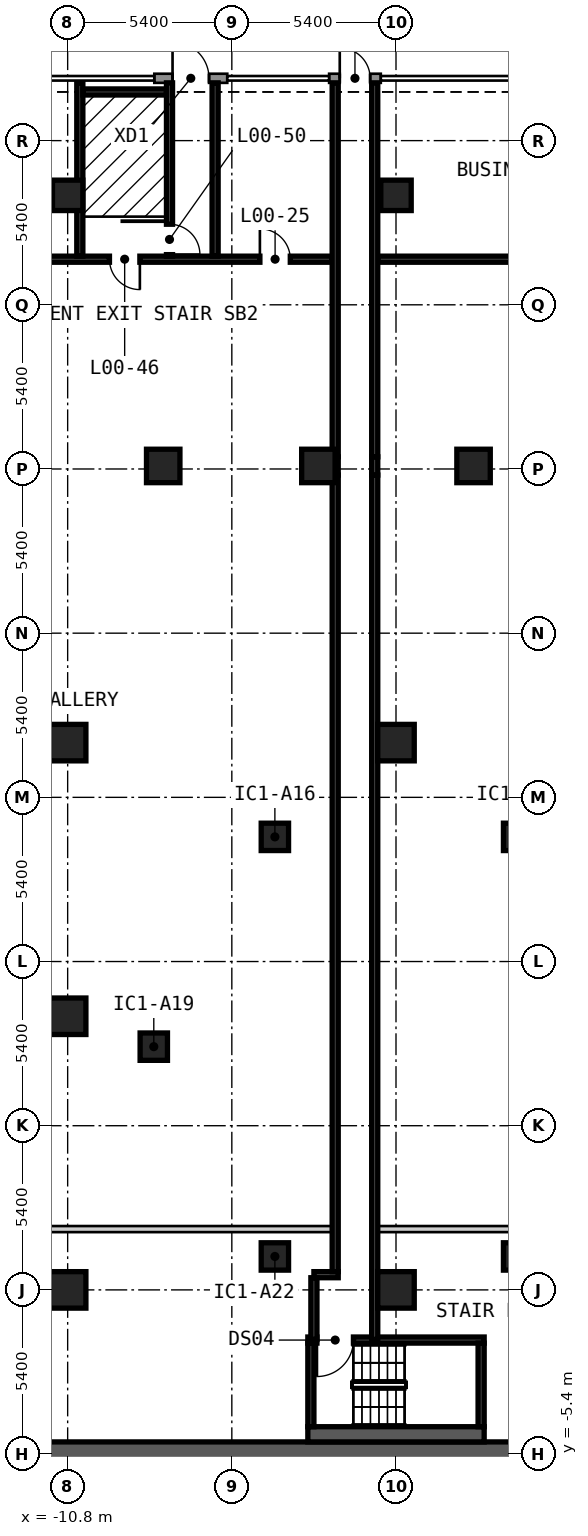
"""IFC4 building model, lengths in metres.
Left out: names, types, materials, properties, quantities, classifications, styles, units other than length and angle.
Written with IfcOpenShell. Run it as: python <this file> out.ifc"""

import sys

from ifc_helpers import new_model, si_unit, direction, frame, frame_2d, origin, origin_2d, place, context, subcontext, project, spatial, rectangle, extrude, element, fill, save


model = new_model("IFC4")
c1 = context("Model", 3, precision=1e-05, world=origin(), true_north=direction((0.0, 1.0)))
c2 = subcontext(c1, "Body", "Model", "MODEL_VIEW")
j1 = project(units=[si_unit("LENGTHUNIT", "METRE"), si_unit("PLANEANGLEUNIT", "RADIAN")], contexts=[c1])
p1 = place(None, origin())
s1 = spatial("IfcSite", under=j1, at=p1, CompositionType="ELEMENT")
p2 = place(p1, origin())
s2 = spatial("IfcBuilding", under=s1, at=p2, CompositionType="ELEMENT")
p3 = place(p2, origin())
s3 = spatial("IfcBuildingStorey", under=s2, at=p3, CompositionType="ELEMENT", Elevation=0.0)
for number, where, z_axis, x_axis in (
    (1, (2.551, 27.1, 0.0), (0.0, 0.0, 1.0), (-1.0, 0.0, 0.0)),
    (2, (-2.553, 27.1, 0.0), (0.0, 0.0, 1.0), (-1.0, 0.0, 0.0)),
    (3, (-7.657, 27.1, 0.0), (0.0, 0.0, 1.0), (-1.0, 0.0, 0.0)),
):
    element("IfcColumn", number, at=place(p3, frame(where, z_axis=z_axis, x_axis=x_axis)), inside=s3, PredefinedType="COLUMN", context=c2, shape_type="SweptSolid", body=[
        extrude(rectangle(XDim=1.1, YDim=1.1, at=origin_2d()), origin(), (0.0, 0.0, 1.0), 5.0),
    ])
for number, where, z_axis, x_axis in (
    (4, (3.984, 1.1, 0.0), (0.0, 0.0, 1.0), (1.0, 0.0, 0.0)),
    (5, (3.984, 14.9, 0.0), (0.0, 0.0, 1.0), (1.0, 0.0, 0.0)),
    (6, (-3.984, 14.9, 0.0), (0.0, 0.0, 1.0), (1.0, 0.0, 0.0)),
    (7, (-7.967, 8.0, 0.0), (0.0, 0.0, 1.0), (1.0, 0.0, 0.0)),
    (8, (-3.984, 1.1, 0.0), (0.0, 0.0, 1.0), (1.0, 0.0, 0.0)),
):
    element("IfcColumn", number, at=place(p3, frame(where, z_axis=z_axis, x_axis=x_axis)), inside=s3, PredefinedType="COLUMN", context=c2, shape_type="SweptSolid", body=[
        extrude(rectangle(XDim=0.9, YDim=0.9, at=origin_2d()), origin(), (0.0, 0.0, 1.0), 5.0),
    ])
for number, where, z_axis, x_axis in (
    (9, (-10.8, 0.0, 0.0), (0.0, 0.0, 1.0), (1.0, 0.0, 0.0)),
    (10, (-10.8, 9.0, 0.0), (0.0, 0.0, 1.0), (1.0, 0.0, 0.0)),
    (11, (-10.8, 18.0, 0.0), (0.0, 0.0, 1.0), (1.0, 0.0, 0.0)),
    (12, (0.0, 0.0, 0.0), (0.0, 0.0, 1.0), (1.0, 0.0, 0.0)),
    (13, (0.0, 18.0, 0.0), (0.0, 0.0, 1.0), (1.0, 0.0, 0.0)),
):
    element("IfcColumn", number, at=place(p3, frame(where, z_axis=z_axis, x_axis=x_axis)), inside=s3, PredefinedType="COLUMN", context=c2, shape_type="SweptSolid", body=[
        extrude(rectangle(XDim=1.2, YDim=1.2, at=origin_2d()), origin(), (0.0, 0.0, 1.0), 5.0),
    ])
for number, where, z_axis, x_axis in (
    (14, (-10.8, 36.0, 0.0), (0.0, 0.0, 1.0), (1.0, 0.0, 0.0)),
    (15, (0.0, 36.0, 0.0), (0.0, 0.0, 1.0), (1.0, 0.0, 0.0)),
):
    element("IfcColumn", number, at=place(p3, frame(where, z_axis=z_axis, x_axis=x_axis)), inside=s3, PredefinedType="COLUMN", context=c2, shape_type="SweptSolid", body=[
        extrude(rectangle(XDim=1.0, YDim=1.0, at=origin_2d()), origin(), (0.0, 0.0, 1.0), 5.0),
    ])
p4 = place(p3, frame((-13.3, -5.6, 0.0), z_axis=(0.0, 0.0, 1.0), x_axis=(1.0, 0.0, 0.0)))
e16 = element("IfcWall", 16, at=p4, inside=s3, PredefinedType="SHEAR", context=c2, shape_type="SweptSolid", body=[
    extrude(rectangle(XDim=26.6, YDim=1.2, at=frame_2d((13.3, 0.0))), origin(), (0.0, 0.0, 1.0), 4.55),
])
p5 = place(p4, frame((23.65, 0.0, 0.0)))
e17 = element("IfcOpeningElement", 17, at=p5, cuts=e16, PredefinedType="OPENING", context=c2, shape_type="SweptSolid", body=[
    extrude(rectangle(XDim=1.2, YDim=2.1, at=frame_2d((0.6, 1.05))), frame((0.0, 0.61, 0.0), z_axis=(0.0, -1.0, 0.0), x_axis=(1.0, 0.0, 0.0)), (0.0, 0.0, 1.0), 1.22),
])
p6 = place(p3, frame((-0.5, 39.85, 0.0), z_axis=(0.0, 0.0, 1.0), x_axis=(-1.0, 0.0, 0.0)))
e18 = element("IfcWall", 18, at=p6, inside=s3, PredefinedType="SOLIDWALL", context=c2, shape_type="SweptSolid", body=[
    extrude(rectangle(XDim=1.7, YDim=0.3, at=frame_2d((0.85, 0.0))), origin(), (0.0, 0.0, 1.0), 4.55),
])
p7 = place(p6, frame((1.35, 0.0, 0.0), z_axis=(0.0, 0.0, 1.0), x_axis=(-1.0, 0.0, 0.0)))
e19 = element("IfcOpeningElement", 19, at=p7, cuts=e18, PredefinedType="OPENING", context=c2, shape_type="SweptSolid", body=[
    extrude(rectangle(XDim=1.0, YDim=2.4, at=frame_2d((0.5, 1.2))), frame((0.0, 0.16, 0.0), z_axis=(0.0, -1.0, 0.0), x_axis=(1.0, 0.0, 0.0)), (0.0, 0.0, 1.0), 0.32),
])
p8 = place(p3, frame((-5.55, 39.85, 0.0), z_axis=(0.0, 0.0, 1.0), x_axis=(-1.0, 0.0, 0.0)))
e20 = element("IfcWall", 20, at=p8, inside=s3, PredefinedType="SOLIDWALL", context=c2, shape_type="SweptSolid", body=[
    extrude(rectangle(XDim=2.4, YDim=0.3, at=frame_2d((1.2, 0.0))), origin(), (0.0, 0.0, 1.0), 4.55),
])
p9 = place(p8, frame((1.8, 0.0, 0.0), z_axis=(0.0, 0.0, 1.0), x_axis=(-1.0, 0.0, 0.0)))
e21 = element("IfcOpeningElement", 21, at=p9, cuts=e20, PredefinedType="OPENING", context=c2, shape_type="SweptSolid", body=[
    extrude(rectangle(XDim=1.2, YDim=2.4, at=frame_2d((0.6, 1.2))), frame((0.0, 0.16, 0.0), z_axis=(0.0, -1.0, 0.0), x_axis=(1.0, 0.0, 0.0)), (0.0, 0.0, 1.0), 0.32),
])
p10 = place(p3, frame((-2.9, -4.75, 0.0), z_axis=(0.0, 0.0, 1.0), x_axis=(1.0, 0.0, 0.0)))
e22 = element("IfcWall", 22, at=p10, inside=s3, PredefinedType="SOLIDWALL", context=c2, shape_type="SweptSolid", body=[
    extrude(rectangle(XDim=5.8, YDim=0.5, at=frame_2d((2.9, 0.0))), origin(), (0.0, 0.0, 1.0), 4.55),
])
p11 = place(p3, frame((-2.9, -1.65, 0.0), z_axis=(0.0, 0.0, 1.0), x_axis=(1.0, 0.0, 0.0)))
e23 = element("IfcWall", 23, at=p11, inside=s3, PredefinedType="SOLIDWALL", context=c2, shape_type="SweptSolid", body=[
    extrude(rectangle(XDim=5.8, YDim=0.2, at=frame_2d((2.9, 0.0))), origin(), (0.0, 0.0, 1.0), 4.55),
])
p12 = place(p11, frame((0.3, 0.0, 0.0)))
e24 = element("IfcOpeningElement", 24, at=p12, cuts=e23, PredefinedType="OPENING", context=c2, shape_type="SweptSolid", body=[
    extrude(rectangle(XDim=1.2, YDim=2.1, at=frame_2d((0.6, 1.05))), frame((0.0, 0.11, 0.0), z_axis=(0.0, -1.0, 0.0), x_axis=(1.0, 0.0, 0.0)), (0.0, 0.0, 1.0), 0.22),
])
for number, where, z_axis, x_axis in (
    (25, (-2.8, -4.5, 0.0), (0.0, 0.0, 1.0), (0.0, 1.0, 0.0)),
    (26, (2.8, -4.5, 0.0), (0.0, 0.0, 1.0), (0.0, 1.0, 0.0)),
):
    element("IfcWall", number, at=place(p3, frame(where, z_axis=z_axis, x_axis=x_axis)), inside=s3, PredefinedType="SOLIDWALL", context=c2, shape_type="SweptSolid", body=[
        extrude(rectangle(XDim=2.75, YDim=0.2, at=frame_2d((1.375, 0.0))), origin(), (0.0, 0.0, 1.0), 4.55),
    ])
p13 = place(p3, frame((-2.7, 0.5, 0.0), z_axis=(0.0, 0.0, 1.0), x_axis=(1.0, 0.0, 0.0)))
e27 = element("IfcWall", 27, at=p13, inside=s3, PredefinedType="SOLIDWALL", context=c2, shape_type="SweptSolid", body=[
    extrude(rectangle(XDim=0.8, YDim=0.2, at=frame_2d((0.4, 0.0))), origin(), (0.0, 0.0, 1.0), 4.55),
])
p14 = place(p3, frame((-24.0, 2.0, 0.0), z_axis=(0.0, 0.0, 1.0), x_axis=(1.0, 0.0, 0.0)))
e28 = element("IfcWall", 28, at=p14, inside=s3, PredefinedType="PARTITIONING", context=c2, shape_type="SweptSolid", body=[
    extrude(rectangle(XDim=22.0, YDim=0.2, at=frame_2d((11.0, 0.0))), origin(), (0.0, 0.0, 1.0), 4.55),
])
p15 = place(p14, frame((10.099, 0.0, 0.0)))
e29 = element("IfcOpeningElement", 29, at=p15, cuts=e28, PredefinedType="OPENING", context=c2, shape_type="SweptSolid", body=[
    extrude(rectangle(XDim=1.8, YDim=2.1, at=frame_2d((0.9, 1.05))), frame((0.0, 0.11, 0.0), z_axis=(0.0, -1.0, 0.0), x_axis=(1.0, 0.0, 0.0)), (0.0, 0.0, 1.0), 0.22),
])
p16 = place(p3, frame((-0.6, 2.0, 0.0), z_axis=(0.0, 0.0, 1.0), x_axis=(1.0, 0.0, 0.0)))
e30 = element("IfcWall", 30, at=p16, inside=s3, PredefinedType="PARTITIONING", context=c2, shape_type="SweptSolid", body=[
    extrude(rectangle(XDim=22.1, YDim=0.2, at=frame_2d((11.05, 0.0))), origin(), (0.0, 0.0, 1.0), 4.55),
])
p17 = place(p16, frame((13.6, 0.0, 0.0)))
e31 = element("IfcOpeningElement", 31, at=p17, cuts=e30, PredefinedType="OPENING", context=c2, shape_type="SweptSolid", body=[
    extrude(rectangle(XDim=1.0, YDim=2.1, at=frame_2d((0.5, 1.05))), frame((0.0, 0.11, 0.0), z_axis=(0.0, -1.0, 0.0), x_axis=(1.0, 0.0, 0.0)), (0.0, 0.0, 1.0), 0.22),
])
p18 = place(p16, frame((16.8, 0.0, 0.0)))
e32 = element("IfcOpeningElement", 32, at=p18, cuts=e30, PredefinedType="OPENING", context=c2, shape_type="SweptSolid", body=[
    extrude(rectangle(XDim=0.9, YDim=2.1, at=frame_2d((0.45, 1.05))), frame((0.0, 0.11, 0.0), z_axis=(0.0, -1.0, 0.0), x_axis=(1.0, 0.0, 0.0)), (0.0, 0.0, 1.0), 0.22),
])
p19 = place(p16, frame((20.1, 0.0, 0.0)))
e33 = element("IfcOpeningElement", 33, at=p19, cuts=e30, PredefinedType="OPENING", context=c2, shape_type="SweptSolid", body=[
    extrude(rectangle(XDim=0.9, YDim=2.1, at=frame_2d((0.45, 1.05))), frame((0.0, 0.11, 0.0), z_axis=(0.0, -1.0, 0.0), x_axis=(1.0, 0.0, 0.0)), (0.0, 0.0, 1.0), 0.22),
])
p20 = place(p16, frame((5.35, 0.0, 0.0)))
e34 = element("IfcOpeningElement", 34, at=p20, cuts=e30, PredefinedType="OPENING", context=c2, shape_type="SweptSolid", body=[
    extrude(rectangle(XDim=1.8, YDim=2.1, at=frame_2d((0.9, 1.05))), frame((0.0, 0.11, 0.0), z_axis=(0.0, -1.0, 0.0), x_axis=(1.0, 0.0, 0.0)), (0.0, 0.0, 1.0), 0.22),
])
p21 = place(p3, frame((-21.0, 33.9, 0.0), z_axis=(0.0, 0.0, 1.0), x_axis=(1.0, 0.0, 0.0)))
e35 = element("IfcWall", 35, at=p21, inside=s3, PredefinedType="SOLIDWALL", context=c2, shape_type="SweptSolid", body=[
    extrude(rectangle(XDim=18.9, YDim=0.2, at=frame_2d((9.45, 0.0))), origin(), (0.0, 0.0, 1.0), 4.55),
])
p22 = place(p21, frame((7.025, 0.0, 0.0)))
e36 = element("IfcOpeningElement", 36, at=p22, cuts=e35, PredefinedType="OPENING", context=c2, shape_type="SweptSolid", body=[
    extrude(rectangle(XDim=1.0, YDim=2.1, at=frame_2d((0.5, 1.05))), frame((0.0, 0.11, 0.0), z_axis=(0.0, -1.0, 0.0), x_axis=(1.0, 0.0, 0.0)), (0.0, 0.0, 1.0), 0.22),
])
p23 = place(p21, frame((16.523, 0.0, 0.0)))
e37 = element("IfcOpeningElement", 37, at=p23, cuts=e35, PredefinedType="OPENING", context=c2, shape_type="SweptSolid", body=[
    extrude(rectangle(XDim=1.0, YDim=2.1, at=frame_2d((0.5, 1.05))), frame((0.0, 0.11, 0.0), z_axis=(0.0, -1.0, 0.0), x_axis=(1.0, 0.0, 0.0)), (0.0, 0.0, 1.0), 0.22),
])
p24 = place(p21, frame((0.893, 0.0, 0.0)))
e38 = element("IfcOpeningElement", 38, at=p24, cuts=e35, PredefinedType="OPENING", context=c2, shape_type="SweptSolid", body=[
    extrude(rectangle(XDim=1.0, YDim=2.1, at=frame_2d((0.5, 1.05))), frame((0.0, 0.11, 0.0), z_axis=(0.0, -1.0, 0.0), x_axis=(1.0, 0.0, 0.0)), (0.0, 0.0, 1.0), 0.22),
])
p25 = place(p21, frame((11.575, 0.0, 0.0)))
e39 = element("IfcOpeningElement", 39, at=p25, cuts=e35, PredefinedType="OPENING", context=c2, shape_type="SweptSolid", body=[
    extrude(rectangle(XDim=1.0, YDim=2.1, at=frame_2d((0.5, 1.05))), frame((0.0, 0.11, 0.0), z_axis=(0.0, -1.0, 0.0), x_axis=(1.0, 0.0, 0.0)), (0.0, 0.0, 1.0), 0.22),
])
p26 = place(p3, frame((-0.6, 33.9, 0.0), z_axis=(0.0, 0.0, 1.0), x_axis=(1.0, 0.0, 0.0)))
e40 = element("IfcWall", 40, at=p26, inside=s3, PredefinedType="SOLIDWALL", context=c2, shape_type="SweptSolid", body=[
    extrude(rectangle(XDim=21.6, YDim=0.2, at=frame_2d((10.8, 0.0))), origin(), (0.0, 0.0, 1.0), 4.55),
])
p27 = place(p26, frame((5.152, 0.0, 0.0)))
e41 = element("IfcOpeningElement", 41, at=p27, cuts=e40, PredefinedType="OPENING", context=c2, shape_type="SweptSolid", body=[
    extrude(rectangle(XDim=1.0, YDim=2.1, at=frame_2d((0.5, 1.05))), frame((0.0, 0.11, 0.0), z_axis=(0.0, -1.0, 0.0), x_axis=(1.0, 0.0, 0.0)), (0.0, 0.0, 1.0), 0.22),
])
p28 = place(p26, frame((13.825, 0.0, 0.0)))
e42 = element("IfcOpeningElement", 42, at=p28, cuts=e40, PredefinedType="OPENING", context=c2, shape_type="SweptSolid", body=[
    extrude(rectangle(XDim=1.0, YDim=2.1, at=frame_2d((0.5, 1.05))), frame((0.0, 0.11, 0.0), z_axis=(0.0, -1.0, 0.0), x_axis=(1.0, 0.0, 0.0)), (0.0, 0.0, 1.0), 0.22),
])
p29 = place(p26, frame((19.707, 0.0, 0.0)))
e43 = element("IfcOpeningElement", 43, at=p29, cuts=e40, PredefinedType="OPENING", context=c2, shape_type="SweptSolid", body=[
    extrude(rectangle(XDim=1.0, YDim=2.1, at=frame_2d((0.5, 1.05))), frame((0.0, 0.11, 0.0), z_axis=(0.0, -1.0, 0.0), x_axis=(1.0, 0.0, 0.0)), (0.0, 0.0, 1.0), 0.22),
])
p30 = place(p3, frame((-10.4, 34.0, 0.0), z_axis=(0.0, 0.0, 1.0), x_axis=(0.0, 1.0, 0.0)))
e44 = element("IfcWall", 44, at=p30, inside=s3, PredefinedType="SOLIDWALL", context=c2, shape_type="SweptSolid", body=[
    extrude(rectangle(XDim=5.7, YDim=0.2, at=frame_2d((2.85, 0.0))), origin(), (0.0, 0.0, 1.0), 4.55),
])
p31 = place(p3, frame((-7.45, 34.0, 0.0), z_axis=(0.0, 0.0, 1.0), x_axis=(0.0, 1.0, 0.0)))
e45 = element("IfcWall", 45, at=p31, inside=s3, PredefinedType="SOLIDWALL", context=c2, shape_type="SweptSolid", body=[
    extrude(rectangle(XDim=5.7, YDim=0.2, at=frame_2d((2.85, 0.0))), origin(), (0.0, 0.0, 1.0), 4.55),
])
p32 = place(p31, frame((1.05, 0.0, 0.0), z_axis=(0.0, 0.0, 1.0), x_axis=(-1.0, 0.0, 0.0)))
e46 = element("IfcOpeningElement", 46, at=p32, cuts=e45, PredefinedType="OPENING", context=c2, shape_type="SweptSolid", body=[
    extrude(rectangle(XDim=1.0, YDim=2.1, at=frame_2d((0.5, 1.05))), frame((0.0, 0.11, 0.0), z_axis=(0.0, -1.0, 0.0), x_axis=(1.0, 0.0, 0.0)), (0.0, 0.0, 1.0), 0.22),
])
p33 = place(p3, frame((-5.95, 34.0, 0.0), z_axis=(0.0, 0.0, 1.0), x_axis=(0.0, 1.0, 0.0)))
e47 = element("IfcWall", 47, at=p33, inside=s3, PredefinedType="SOLIDWALL", context=c2, shape_type="SweptSolid", body=[
    extrude(rectangle(XDim=5.7, YDim=0.2, at=frame_2d((2.85, 0.0))), origin(), (0.0, 0.0, 1.0), 4.55),
])
p34 = place(p3, frame((-2.7, -1.63, 0.0), z_axis=(0.0, 0.0, 1.0), x_axis=(0.0, 1.0, 0.0)))
e48 = element("IfcWall", 48, at=p34, inside=s3, PredefinedType="SOLIDWALL", context=c2, shape_type="SweptSolid", body=[
    extrude(rectangle(XDim=2.03, YDim=0.2, at=frame_2d((1.015, 0.0))), origin(), (0.0, 0.0, 1.0), 4.55),
])
p35 = place(p3, frame((-2.0, 0.6, 0.0), z_axis=(0.0, 0.0, 1.0), x_axis=(0.0, 1.0, 0.0)))
e49 = element("IfcWall", 49, at=p35, inside=s3, PredefinedType="SOLIDWALL", context=c2, shape_type="SweptSolid", body=[
    extrude(rectangle(XDim=26.2, YDim=0.2, at=frame_2d((13.1, 0.0))), origin(), (0.0, 0.0, 1.0), 4.55),
])
p36 = place(p3, frame((-2.0, 26.8, 0.0), z_axis=(0.0, 0.0, 1.0), x_axis=(0.0, 1.0, 0.0)))
e50 = element("IfcWall", 50, at=p36, inside=s3, PredefinedType="SOLIDWALL", context=c2, shape_type="SweptSolid", body=[
    extrude(rectangle(XDim=0.6, YDim=0.2, at=frame_2d((0.3, 0.0))), origin(), (0.0, 0.0, 1.0), 3.82),
])
p37 = place(p3, frame((-2.0, 27.4, 0.0), z_axis=(0.0, 0.0, 1.0), x_axis=(0.0, 1.0, 0.0)))
e51 = element("IfcWall", 51, at=p37, inside=s3, PredefinedType="SOLIDWALL", context=c2, shape_type="SweptSolid", body=[
    extrude(rectangle(XDim=12.3, YDim=0.2, at=frame_2d((6.15, 0.0))), origin(), (0.0, 0.0, 1.0), 4.55),
])
p38 = place(p3, frame((-0.7, -1.63, 0.0), z_axis=(0.0, 0.0, 1.0), x_axis=(0.0, 1.0, 0.0)))
e52 = element("IfcWall", 52, at=p38, inside=s3, PredefinedType="SOLIDWALL", context=c2, shape_type="SweptSolid", body=[
    extrude(rectangle(XDim=28.43, YDim=0.2, at=frame_2d((14.215, 0.0))), origin(), (0.0, 0.0, 1.0), 4.55),
])
p39 = place(p3, frame((-0.7, 26.8, 0.0), z_axis=(0.0, 0.0, 1.0), x_axis=(0.0, 1.0, 0.0)))
e53 = element("IfcWall", 53, at=p39, inside=s3, PredefinedType="SOLIDWALL", context=c2, shape_type="SweptSolid", body=[
    extrude(rectangle(XDim=0.6, YDim=0.2, at=frame_2d((0.3, 0.0))), origin(), (0.0, 0.0, 1.0), 3.82),
])
p40 = place(p3, frame((-0.7, 27.4, 0.0), z_axis=(0.0, 0.0, 1.0), x_axis=(0.0, 1.0, 0.0)))
e54 = element("IfcWall", 54, at=p40, inside=s3, PredefinedType="SOLIDWALL", context=c2, shape_type="SweptSolid", body=[
    extrude(rectangle(XDim=12.3, YDim=0.2, at=frame_2d((6.15, 0.0))), origin(), (0.0, 0.0, 1.0), 4.55),
])
p41 = place(p3, frame((-10.3, 39.4, 0.0), z_axis=(0.0, 0.0, 1.0), x_axis=(1.0, 0.0, 0.0)))
e55 = element("IfcWall", 55, at=p41, inside=s3, PredefinedType="SOLIDWALL", context=c2, shape_type="SweptSolid", body=[
    extrude(rectangle(XDim=2.75, YDim=0.2, at=frame_2d((1.375, 0.0))), origin(), (0.0, 0.0, 1.0), 4.55),
])
p42 = place(p7, origin())
e56 = element("IfcDoor", 56, at=p42, inside=s3, OperationType="SINGLE_SWING_RIGHT", PredefinedType="DOOR", context=c2, shape_type="SweptSolid", body=[
    extrude(rectangle(XDim=1.0, YDim=2.4, at=frame_2d((0.5, 1.2))), frame((0.0, 0.025, 0.0), z_axis=(0.0, -1.0, 0.0), x_axis=(1.0, 0.0, 0.0)), (0.0, 0.0, 1.0), 0.05),
])
fill(e19, e56)
p43 = place(p9, origin())
e57 = element("IfcDoor", 57, at=p43, inside=s3, OperationType="SINGLE_SWING_RIGHT", PredefinedType="DOOR", context=c2, shape_type="SweptSolid", body=[
    extrude(rectangle(XDim=1.2, YDim=2.4, at=frame_2d((0.6, 1.2))), frame((0.0, 0.025, 0.0), z_axis=(0.0, -1.0, 0.0), x_axis=(1.0, 0.0, 0.0)), (0.0, 0.0, 1.0), 0.05),
])
fill(e21, e57)
p44 = place(p12, origin())
e58 = element("IfcDoor", 58, at=p44, inside=s3, OperationType="SINGLE_SWING_LEFT", PredefinedType="DOOR", context=c2, shape_type="SweptSolid", body=[
    extrude(rectangle(XDim=1.2, YDim=2.1, at=frame_2d((0.6, 1.05))), frame((0.0, 0.025, 0.0), z_axis=(0.0, -1.0, 0.0), x_axis=(1.0, 0.0, 0.0)), (0.0, 0.0, 1.0), 0.05),
])
fill(e24, e58)
p45 = place(p23, origin())
e59 = element("IfcDoor", 59, at=p45, inside=s3, OperationType="SINGLE_SWING_LEFT", PredefinedType="DOOR", context=c2, shape_type="SweptSolid", body=[
    extrude(rectangle(XDim=1.0, YDim=2.1, at=frame_2d((0.5, 1.05))), frame((0.0, 0.025, 0.0), z_axis=(0.0, -1.0, 0.0), x_axis=(1.0, 0.0, 0.0)), (0.0, 0.0, 1.0), 0.05),
])
fill(e37, e59)
p46 = place(p25, origin())
e60 = element("IfcDoor", 60, at=p46, inside=s3, OperationType="SINGLE_SWING_RIGHT", PredefinedType="DOOR", context=c2, shape_type="SweptSolid", body=[
    extrude(rectangle(XDim=1.0, YDim=2.1, at=frame_2d((0.5, 1.05))), frame((0.0, 0.025, 0.0), z_axis=(0.0, -1.0, 0.0), x_axis=(1.0, 0.0, 0.0)), (0.0, 0.0, 1.0), 0.05),
])
fill(e39, e60)
p47 = place(p32, origin())
e61 = element("IfcDoor", 61, at=p47, inside=s3, OperationType="SINGLE_SWING_RIGHT", PredefinedType="DOOR", context=c2, shape_type="SweptSolid", body=[
    extrude(rectangle(XDim=1.0, YDim=2.1, at=frame_2d((0.5, 1.05))), frame((0.0, 0.025, 0.0), z_axis=(0.0, -1.0, 0.0), x_axis=(1.0, 0.0, 0.0)), (0.0, 0.0, 1.0), 0.05),
])
fill(e46, e61)
save(model, sys.argv[1])
